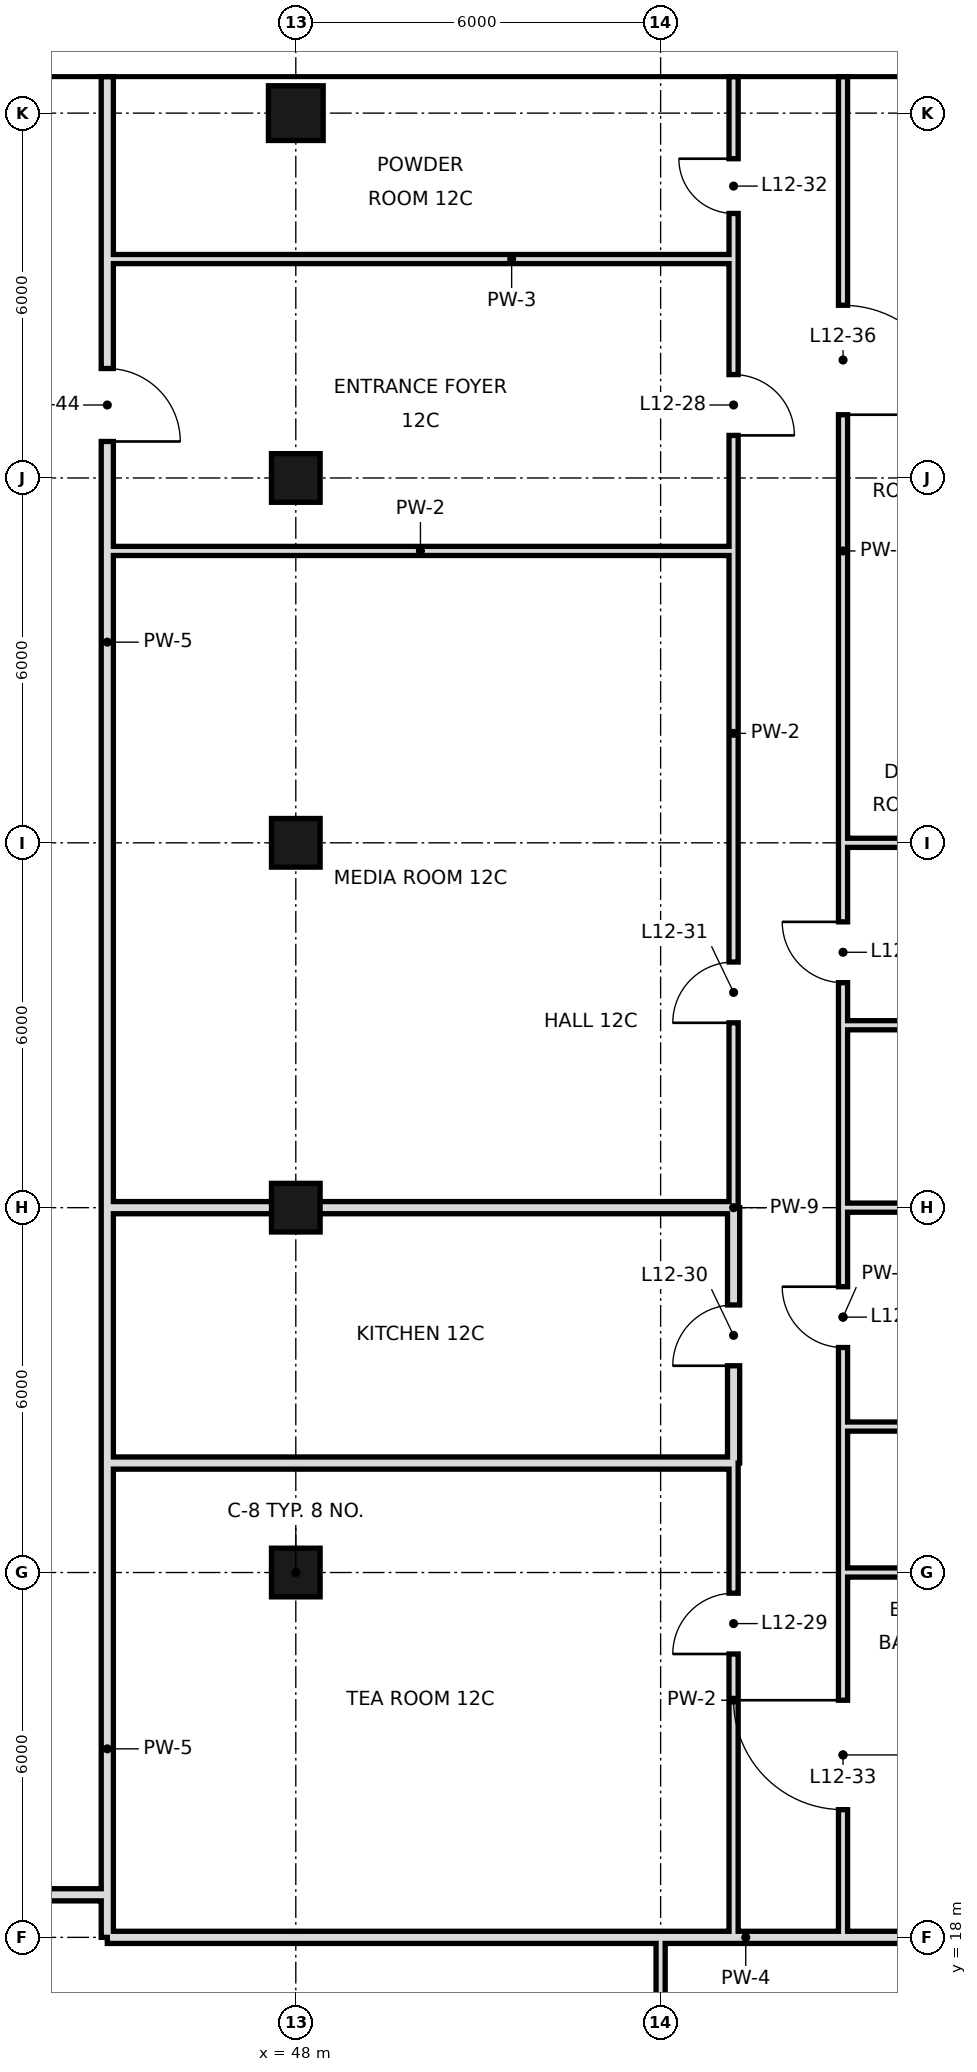
"""IFC4 building model, lengths in metres.
Left out: names, types, materials, properties, quantities, classifications, styles, units other than length and angle.
Written with IfcOpenShell. Run it as: python <this file> out.ifc"""

import sys

from ifc_helpers import new_model, si_unit, direction, frame, frame_2d, origin, origin_2d, place, context, subcontext, project, spatial, rectangle, hollow_rectangle, extrude, element, fill, save


model = new_model("IFC4")
c1 = context("Model", 3, precision=1e-05, world=origin(), true_north=direction((0.0, 1.0)))
c2 = subcontext(c1, "Body", "Model", "MODEL_VIEW")
j1 = project(units=[si_unit("LENGTHUNIT", "METRE"), si_unit("PLANEANGLEUNIT", "RADIAN")], contexts=[c1])
p1 = place(None, origin())
s1 = spatial("IfcSite", under=j1, at=p1, CompositionType="ELEMENT")
p2 = place(p1, origin())
s2 = spatial("IfcBuilding", under=s1, at=p2, CompositionType="ELEMENT")
p3 = place(p2, frame((0.0, 0.0, 64.2)))
s3 = spatial("IfcBuildingStorey", under=s2, at=p3, CompositionType="ELEMENT", Elevation=64.2)
for number, where, z_axis, x_axis in (
    (1, (48.0, 24.0, 0.0), (0.0, 0.0, 1.0), (1.0, 0.0, 0.0)),
    (2, (48.0, 30.0, 0.0), (0.0, 0.0, 1.0), (1.0, 0.0, 0.0)),
    (3, (48.0, 36.0, 0.0), (0.0, 0.0, 1.0), (1.0, 0.0, 0.0)),
    (4, (48.0, 42.0, 0.0), (0.0, 0.0, 1.0), (1.0, 0.0, 0.0)),
):
    element("IfcColumn", number, at=place(p3, frame(where, z_axis=z_axis, x_axis=x_axis)), inside=s3, PredefinedType="COLUMN", context=c2, shape_type="SweptSolid", body=[
        extrude(hollow_rectangle(XDim=0.8, YDim=0.8, WallThickness=0.04, at=origin_2d()), origin(), (0.0, 0.0, 1.0), 3.6),
    ])
p4 = place(p3, frame((48.0, 48.0, 0.0), z_axis=(0.0, 0.0, 1.0), x_axis=(1.0, 0.0, 0.0)))
e5 = element("IfcColumn", 5, at=p4, inside=s3, PredefinedType="COLUMN", context=c2, shape_type="SweptSolid", body=[
    extrude(hollow_rectangle(XDim=0.9, YDim=0.9, WallThickness=0.045, at=origin_2d()), origin(), (0.0, 0.0, 1.0), 3.6),
])
p5 = place(p3, frame((44.9, 18.7, 0.0), z_axis=(0.0, 0.0, 1.0), x_axis=(0.0, 1.0, 0.0)))
e6 = element("IfcWall", 6, at=p5, inside=s3, PredefinedType="SOLIDWALL", context=c2, shape_type="SweptSolid", body=[
    extrude(rectangle(XDim=7.1, YDim=0.2, at=frame_2d((3.55, 0.0))), origin(), (0.0, 0.0, 1.0), 3.42),
])
p6 = place(p3, frame((44.9, 30.0, 0.0), z_axis=(0.0, 0.0, 1.0), x_axis=(0.0, 1.0, 0.0)))
e7 = element("IfcWall", 7, at=p6, inside=s3, PredefinedType="SOLIDWALL", context=c2, shape_type="SweptSolid", body=[
    extrude(rectangle(XDim=18.6, YDim=0.2, at=frame_2d((9.3, 0.0))), origin(), (0.0, 0.0, 1.0), 2.72),
])
p7 = place(p6, frame((12.6, 0.0, 0.0)))
e8 = element("IfcOpeningElement", 8, at=p7, cuts=e7, PredefinedType="OPENING", context=c2, shape_type="SweptSolid", body=[
    extrude(rectangle(XDim=1.2, YDim=2.4, at=frame_2d((0.6, 1.2))), frame((0.0, 0.11, 0.0), z_axis=(0.0, -1.0, 0.0), x_axis=(1.0, 0.0, 0.0)), (0.0, 0.0, 1.0), 0.22),
])
p8 = place(p3, frame((44.9, 25.8, 0.0), z_axis=(0.0, 0.0, 1.0), x_axis=(0.0, 1.0, 0.0)))
e9 = element("IfcWall", 9, at=p8, inside=s3, PredefinedType="SOLIDWALL", context=c2, shape_type="SweptSolid", body=[
    extrude(rectangle(XDim=4.2, YDim=0.2, at=frame_2d((2.1, 0.0))), origin(), (0.0, 0.0, 1.0), 2.97),
])
p9 = place(p3, frame((44.9, 18.0, 0.0), z_axis=(0.0, 0.0, 1.0), x_axis=(0.0, 1.0, 0.0)))
e10 = element("IfcWall", 10, at=p9, inside=s3, PredefinedType="SOLIDWALL", context=c2, shape_type="SweptSolid", body=[
    extrude(rectangle(XDim=0.7, YDim=0.2, at=frame_2d((0.35, 0.0))), origin(), (0.0, 0.0, 1.0), 2.97),
])
p10 = place(p3, frame((54.0, 10.8, 0.0), z_axis=(0.0, 0.0, 1.0), x_axis=(0.0, 1.0, 0.0)))
e11 = element("IfcWall", 11, at=p10, inside=s3, PredefinedType="PARTITIONING", context=c2, shape_type="SweptSolid", body=[
    extrude(rectangle(XDim=7.2, YDim=0.15, at=frame_2d((3.6, 0.0))), origin(), (0.0, 0.0, 1.0), 3.42),
])
p11 = place(p3, frame((55.2, 25.8, 0.0), z_axis=(0.0, 0.0, 1.0), x_axis=(0.0, 1.0, 0.0)))
e12 = element("IfcWall", 12, at=p11, inside=s3, PredefinedType="SOLIDWALL", context=c2, shape_type="SweptSolid", body=[
    extrude(rectangle(XDim=4.2, YDim=0.2, at=frame_2d((2.1, 0.0))), origin(), (0.0, 0.0, 1.0), 2.52),
])
p12 = place(p11, frame((1.6, 0.0, 0.0)))
e13 = element("IfcOpeningElement", 13, at=p12, cuts=e12, PredefinedType="OPENING", context=c2, shape_type="SweptSolid", body=[
    extrude(rectangle(XDim=1.0, YDim=2.4, at=frame_2d((0.5, 1.2))), frame((0.0, 0.11, 0.0), z_axis=(0.0, -1.0, 0.0), x_axis=(1.0, 0.0, 0.0)), (0.0, 0.0, 1.0), 0.22),
])
p13 = place(p3, frame((55.2, 18.0, 0.0), z_axis=(0.0, 0.0, 1.0), x_axis=(0.0, 1.0, 0.0)))
e14 = element("IfcWall", 14, at=p13, inside=s3, PredefinedType="PARTITIONING", context=c2, shape_type="SweptSolid", body=[
    extrude(rectangle(XDim=7.8, YDim=0.15, at=frame_2d((3.9, 0.0))), origin(), (0.0, 0.0, 1.0), 3.42),
])
p14 = place(p13, frame((4.66, 0.0, 0.0)))
e15 = element("IfcOpeningElement", 15, at=p14, cuts=e14, PredefinedType="OPENING", context=c2, shape_type="SweptSolid", body=[
    extrude(rectangle(XDim=1.0, YDim=2.4, at=frame_2d((0.5, 1.2))), frame((0.0, 0.085, 0.0), z_axis=(0.0, -1.0, 0.0), x_axis=(1.0, 0.0, 0.0)), (0.0, 0.0, 1.0), 0.17),
])
p15 = place(p3, frame((55.2, 30.0, 0.0), z_axis=(0.0, 0.0, 1.0), x_axis=(0.0, 1.0, 0.0)))
e16 = element("IfcWall", 16, at=p15, inside=s3, PredefinedType="PARTITIONING", context=c2, shape_type="SweptSolid", body=[
    extrude(rectangle(XDim=15.6, YDim=0.15, at=frame_2d((7.8, 0.0))), origin(), (0.0, 0.0, 1.0), 3.42),
])
p16 = place(p15, frame((12.7, 0.0, 0.0)))
e17 = element("IfcOpeningElement", 17, at=p16, cuts=e16, PredefinedType="OPENING", context=c2, shape_type="SweptSolid", body=[
    extrude(rectangle(XDim=1.0, YDim=2.4, at=frame_2d((0.5, 1.2))), frame((0.0, 0.085, 0.0), z_axis=(0.0, -1.0, 0.0), x_axis=(1.0, 0.0, 0.0)), (0.0, 0.0, 1.0), 0.17),
])
p17 = place(p15, frame((3.04, 0.0, 0.0)))
e18 = element("IfcOpeningElement", 18, at=p17, cuts=e16, PredefinedType="OPENING", context=c2, shape_type="SweptSolid", body=[
    extrude(rectangle(XDim=1.0, YDim=2.4, at=frame_2d((0.5, 1.2))), frame((0.0, 0.085, 0.0), z_axis=(0.0, -1.0, 0.0), x_axis=(1.0, 0.0, 0.0)), (0.0, 0.0, 1.0), 0.17),
])
p18 = place(p3, frame((55.2, 45.6, 0.0), z_axis=(0.0, 0.0, 1.0), x_axis=(0.0, 1.0, 0.0)))
e19 = element("IfcWall", 19, at=p18, inside=s3, PredefinedType="PARTITIONING", context=c2, shape_type="SweptSolid", body=[
    extrude(rectangle(XDim=3.0, YDim=0.15, at=frame_2d((1.5, 0.0))), origin(), (0.0, 0.0, 1.0), 3.42),
])
p19 = place(p18, frame((0.75, 0.0, 0.0)))
e20 = element("IfcOpeningElement", 20, at=p19, cuts=e19, PredefinedType="OPENING", context=c2, shape_type="SweptSolid", body=[
    extrude(rectangle(XDim=0.9, YDim=2.4, at=frame_2d((0.45, 1.2))), frame((0.0, 0.085, 0.0), z_axis=(0.0, -1.0, 0.0), x_axis=(1.0, 0.0, 0.0)), (0.0, 0.0, 1.0), 0.17),
])
p20 = place(p3, frame((57.0, 18.0, 0.0), z_axis=(0.0, 0.0, 1.0), x_axis=(0.0, 1.0, 0.0)))
e21 = element("IfcWall", 21, at=p20, inside=s3, PredefinedType="PARTITIONING", context=c2, shape_type="SweptSolid", body=[
    extrude(rectangle(XDim=6.0, YDim=0.15, at=frame_2d((3.0, 0.0))), origin(), (0.0, 0.0, 1.0), 3.42),
])
p21 = place(p20, frame((2.1, 0.0, 0.0)))
e22 = element("IfcOpeningElement", 22, at=p21, cuts=e21, PredefinedType="OPENING", context=c2, shape_type="SweptSolid", body=[
    extrude(rectangle(XDim=1.8, YDim=2.4, at=frame_2d((0.9, 1.2))), frame((0.0, 0.085, 0.0), z_axis=(0.0, -1.0, 0.0), x_axis=(1.0, 0.0, 0.0)), (0.0, 0.0, 1.0), 0.17),
])
p22 = place(p3, frame((57.0, 26.4, 0.0), z_axis=(0.0, 0.0, 1.0), x_axis=(0.0, 1.0, 0.0)))
e23 = element("IfcWall", 23, at=p22, inside=s3, PredefinedType="PARTITIONING", context=c2, shape_type="SweptSolid", body=[
    extrude(rectangle(XDim=3.6, YDim=0.15, at=frame_2d((1.8, 0.0))), origin(), (0.0, 0.0, 1.0), 3.42),
])
p23 = place(p22, frame((1.3, 0.0, 0.0)))
e24 = element("IfcOpeningElement", 24, at=p23, cuts=e23, PredefinedType="OPENING", context=c2, shape_type="SweptSolid", body=[
    extrude(rectangle(XDim=1.0, YDim=2.4, at=frame_2d((0.5, 1.2))), frame((0.0, 0.085, 0.0), z_axis=(0.0, -1.0, 0.0), x_axis=(1.0, 0.0, 0.0)), (0.0, 0.0, 1.0), 0.17),
])
p24 = place(p3, frame((57.0, 33.0, 0.0), z_axis=(0.0, 0.0, 1.0), x_axis=(0.0, 1.0, 0.0)))
e25 = element("IfcWall", 25, at=p24, inside=s3, PredefinedType="PARTITIONING", context=c2, shape_type="SweptSolid", body=[
    extrude(rectangle(XDim=15.6, YDim=0.15, at=frame_2d((7.8, 0.0))), origin(), (0.0, 0.0, 1.0), 3.42),
])
p25 = place(p24, frame((0.7, 0.0, 0.0)))
e26 = element("IfcOpeningElement", 26, at=p25, cuts=e25, PredefinedType="OPENING", context=c2, shape_type="SweptSolid", body=[
    extrude(rectangle(XDim=1.0, YDim=2.4, at=frame_2d((0.5, 1.2))), frame((0.0, 0.085, 0.0), z_axis=(0.0, -1.0, 0.0), x_axis=(1.0, 0.0, 0.0)), (0.0, 0.0, 1.0), 0.17),
])
p26 = place(p24, frame((10.04, 0.0, 0.0)))
e27 = element("IfcOpeningElement", 27, at=p26, cuts=e25, PredefinedType="OPENING", context=c2, shape_type="SweptSolid", body=[
    extrude(rectangle(XDim=1.8, YDim=2.4, at=frame_2d((0.9, 1.2))), frame((0.0, 0.085, 0.0), z_axis=(0.0, -1.0, 0.0), x_axis=(1.0, 0.0, 0.0)), (0.0, 0.0, 1.0), 0.17),
])
p27 = place(p3, frame((57.0, 24.0, 0.0), z_axis=(0.0, 0.0, 1.0), x_axis=(0.0, 1.0, 0.0)))
e28 = element("IfcWall", 28, at=p27, inside=s3, PredefinedType="PARTITIONING", context=c2, shape_type="SweptSolid", body=[
    extrude(rectangle(XDim=2.4, YDim=0.15, at=frame_2d((1.2, 0.0))), origin(), (0.0, 0.0, 1.0), 3.42),
])
p28 = place(p3, frame((57.0, 30.0, 0.0), z_axis=(0.0, 0.0, 1.0), x_axis=(0.0, 1.0, 0.0)))
e29 = element("IfcWall", 29, at=p28, inside=s3, PredefinedType="PARTITIONING", context=c2, shape_type="SweptSolid", body=[
    extrude(rectangle(XDim=3.0, YDim=0.15, at=frame_2d((1.5, 0.0))), origin(), (0.0, 0.0, 1.0), 3.42),
])
p29 = place(p3, frame((44.9, 18.0, 0.0), z_axis=(0.0, 0.0, 1.0), x_axis=(1.0, 0.0, 0.0)))
e30 = element("IfcWall", 30, at=p29, inside=s3, PredefinedType="SOLIDWALL", context=c2, shape_type="SweptSolid", body=[
    extrude(rectangle(XDim=21.7, YDim=0.2, at=frame_2d((10.85, 0.0))), origin(), (0.0, 0.0, 1.0), 2.52),
])
p30 = place(p3, frame((42.6, 18.7, 0.0), z_axis=(0.0, 0.0, 1.0), x_axis=(1.0, 0.0, 0.0)))
e31 = element("IfcWall", 31, at=p30, inside=s3, PredefinedType="SOLIDWALL", context=c2, shape_type="SweptSolid", body=[
    extrude(rectangle(XDim=2.3, YDim=0.2, at=frame_2d((1.15, 0.0))), origin(), (0.0, 0.0, 1.0), 3.42),
])
p31 = place(p3, frame((57.0, 24.0, 0.0), z_axis=(0.0, 0.0, 1.0), x_axis=(1.0, 0.0, 0.0)))
e32 = element("IfcWall", 32, at=p31, inside=s3, PredefinedType="PARTITIONING", context=c2, shape_type="SweptSolid", body=[
    extrude(rectangle(XDim=3.0, YDim=0.15, at=frame_2d((1.5, 0.0))), origin(), (0.0, 0.0, 1.0), 2.52),
])
p32 = place(p3, frame((44.9, 25.8, 0.0), z_axis=(0.0, 0.0, 1.0), x_axis=(1.0, 0.0, 0.0)))
e33 = element("IfcWall", 33, at=p32, inside=s3, PredefinedType="SOLIDWALL", context=c2, shape_type="SweptSolid", body=[
    extrude(rectangle(XDim=10.3, YDim=0.2, at=frame_2d((5.15, 0.0))), origin(), (0.0, 0.0, 1.0), 2.97),
])
p33 = place(p3, frame((57.0, 26.4, 0.0), z_axis=(0.0, 0.0, 1.0), x_axis=(1.0, 0.0, 0.0)))
e34 = element("IfcWall", 34, at=p33, inside=s3, PredefinedType="PARTITIONING", context=c2, shape_type="SweptSolid", body=[
    extrude(rectangle(XDim=3.0, YDim=0.15, at=frame_2d((1.5, 0.0))), origin(), (0.0, 0.0, 1.0), 3.42),
])
p34 = place(p3, frame((44.9, 30.0, 0.0), z_axis=(0.0, 0.0, 1.0), x_axis=(1.0, 0.0, 0.0)))
e35 = element("IfcWall", 35, at=p34, inside=s3, PredefinedType="SOLIDWALL", context=c2, shape_type="SweptSolid", body=[
    extrude(rectangle(XDim=10.3, YDim=0.2, at=frame_2d((5.15, 0.0))), origin(), (0.0, 0.0, 1.0), 2.52),
])
p35 = place(p3, frame((57.0, 30.0, 0.0), z_axis=(0.0, 0.0, 1.0), x_axis=(1.0, 0.0, 0.0)))
e36 = element("IfcWall", 36, at=p35, inside=s3, PredefinedType="PARTITIONING", context=c2, shape_type="SweptSolid", body=[
    extrude(rectangle(XDim=3.0, YDim=0.15, at=frame_2d((1.5, 0.0))), origin(), (0.0, 0.0, 1.0), 2.52),
])
p36 = place(p3, frame((57.0, 33.0, 0.0), z_axis=(0.0, 0.0, 1.0), x_axis=(1.0, 0.0, 0.0)))
e37 = element("IfcWall", 37, at=p36, inside=s3, PredefinedType="PARTITIONING", context=c2, shape_type="SweptSolid", body=[
    extrude(rectangle(XDim=3.0, YDim=0.15, at=frame_2d((1.5, 0.0))), origin(), (0.0, 0.0, 1.0), 3.42),
])
p37 = place(p3, frame((57.0, 36.0, 0.0), z_axis=(0.0, 0.0, 1.0), x_axis=(1.0, 0.0, 0.0)))
e38 = element("IfcWall", 38, at=p37, inside=s3, PredefinedType="PARTITIONING", context=c2, shape_type="SweptSolid", body=[
    extrude(rectangle(XDim=9.0, YDim=0.15, at=frame_2d((4.5, 0.0))), origin(), (0.0, 0.0, 1.0), 2.52),
])
for number, where, z_axis, x_axis in (
    (39, (44.9, 40.8, 0.0), (0.0, 0.0, 1.0), (1.0, 0.0, 0.0)),
    (40, (44.9, 45.6, 0.0), (0.0, 0.0, 1.0), (1.0, 0.0, 0.0)),
):
    element("IfcWall", number, at=place(p3, frame(where, z_axis=z_axis, x_axis=x_axis)), inside=s3, PredefinedType="PARTITIONING", context=c2, shape_type="SweptSolid", body=[
        extrude(rectangle(XDim=10.3, YDim=0.15, at=frame_2d((5.15, 0.0))), origin(), (0.0, 0.0, 1.0), 3.42),
    ])
p38 = place(p16, frame((1.0, 0.0, 0.0), z_axis=(0.0, 0.0, 1.0), x_axis=(-1.0, 0.0, 0.0)))
e41 = element("IfcDoor", 41, at=p38, inside=s3, OperationType="SINGLE_SWING_RIGHT", PredefinedType="DOOR", context=c2, shape_type="SweptSolid", body=[
    extrude(rectangle(XDim=1.0, YDim=2.4, at=frame_2d((0.5, 1.2))), frame((0.0, 0.025, 0.0), z_axis=(0.0, -1.0, 0.0), x_axis=(1.0, 0.0, 0.0)), (0.0, 0.0, 1.0), 0.05),
])
fill(e17, e41)
p39 = place(p14, origin())
e42 = element("IfcDoor", 42, at=p39, inside=s3, OperationType="SINGLE_SWING_LEFT", PredefinedType="DOOR", context=c2, shape_type="SweptSolid", body=[
    extrude(rectangle(XDim=1.0, YDim=2.4, at=frame_2d((0.5, 1.2))), frame((0.0, 0.025, 0.0), z_axis=(0.0, -1.0, 0.0), x_axis=(1.0, 0.0, 0.0)), (0.0, 0.0, 1.0), 0.05),
])
fill(e15, e42)
p40 = place(p12, origin())
e43 = element("IfcDoor", 43, at=p40, inside=s3, OperationType="SINGLE_SWING_LEFT", PredefinedType="DOOR", context=c2, shape_type="SweptSolid", body=[
    extrude(rectangle(XDim=1.0, YDim=2.4, at=frame_2d((0.5, 1.2))), frame((0.0, 0.025, 0.0), z_axis=(0.0, -1.0, 0.0), x_axis=(1.0, 0.0, 0.0)), (0.0, 0.0, 1.0), 0.05),
])
fill(e13, e43)
p41 = place(p17, origin())
e44 = element("IfcDoor", 44, at=p41, inside=s3, OperationType="SINGLE_SWING_LEFT", PredefinedType="DOOR", context=c2, shape_type="SweptSolid", body=[
    extrude(rectangle(XDim=1.0, YDim=2.4, at=frame_2d((0.5, 1.2))), frame((0.0, 0.025, 0.0), z_axis=(0.0, -1.0, 0.0), x_axis=(1.0, 0.0, 0.0)), (0.0, 0.0, 1.0), 0.05),
])
fill(e18, e44)
p42 = place(p19, frame((0.9, 0.0, 0.0), z_axis=(0.0, 0.0, 1.0), x_axis=(-1.0, 0.0, 0.0)))
e45 = element("IfcDoor", 45, at=p42, inside=s3, OperationType="SINGLE_SWING_LEFT", PredefinedType="DOOR", context=c2, shape_type="SweptSolid", body=[
    extrude(rectangle(XDim=0.9, YDim=2.4, at=frame_2d((0.45, 1.2))), frame((0.0, 0.025, 0.0), z_axis=(0.0, -1.0, 0.0), x_axis=(1.0, 0.0, 0.0)), (0.0, 0.0, 1.0), 0.05),
])
fill(e20, e45)
p43 = place(p21, frame((1.8, 0.0, 0.0), z_axis=(0.0, 0.0, 1.0), x_axis=(-1.0, 0.0, 0.0)))
e46 = element("IfcDoor", 46, at=p43, inside=s3, OperationType="SINGLE_SWING_LEFT", PredefinedType="DOOR", context=c2, shape_type="SweptSolid", body=[
    extrude(rectangle(XDim=1.8, YDim=2.4, at=frame_2d((0.9, 1.2))), frame((0.0, 0.025, 0.0), z_axis=(0.0, -1.0, 0.0), x_axis=(1.0, 0.0, 0.0)), (0.0, 0.0, 1.0), 0.05),
])
fill(e22, e46)
p44 = place(p23, frame((1.0, 0.0, 0.0), z_axis=(0.0, 0.0, 1.0), x_axis=(-1.0, 0.0, 0.0)))
e47 = element("IfcDoor", 47, at=p44, inside=s3, OperationType="SINGLE_SWING_LEFT", PredefinedType="DOOR", context=c2, shape_type="SweptSolid", body=[
    extrude(rectangle(XDim=1.0, YDim=2.4, at=frame_2d((0.5, 1.2))), frame((0.0, 0.025, 0.0), z_axis=(0.0, -1.0, 0.0), x_axis=(1.0, 0.0, 0.0)), (0.0, 0.0, 1.0), 0.05),
])
fill(e24, e47)
p45 = place(p25, frame((1.0, 0.0, 0.0), z_axis=(0.0, 0.0, 1.0), x_axis=(-1.0, 0.0, 0.0)))
e48 = element("IfcDoor", 48, at=p45, inside=s3, OperationType="SINGLE_SWING_LEFT", PredefinedType="DOOR", context=c2, shape_type="SweptSolid", body=[
    extrude(rectangle(XDim=1.0, YDim=2.4, at=frame_2d((0.5, 1.2))), frame((0.0, 0.025, 0.0), z_axis=(0.0, -1.0, 0.0), x_axis=(1.0, 0.0, 0.0)), (0.0, 0.0, 1.0), 0.05),
])
fill(e26, e48)
p46 = place(p26, frame((1.8, 0.0, 0.0), z_axis=(0.0, 0.0, 1.0), x_axis=(-1.0, 0.0, 0.0)))
e49 = element("IfcDoor", 49, at=p46, inside=s3, OperationType="SINGLE_SWING_RIGHT", PredefinedType="DOOR", context=c2, shape_type="SweptSolid", body=[
    extrude(rectangle(XDim=1.8, YDim=2.4, at=frame_2d((0.9, 1.2))), frame((0.0, 0.025, 0.0), z_axis=(0.0, -1.0, 0.0), x_axis=(1.0, 0.0, 0.0)), (0.0, 0.0, 1.0), 0.05),
])
fill(e27, e49)
p47 = place(p7, frame((1.2, 0.0, 0.0), z_axis=(0.0, 0.0, 1.0), x_axis=(-1.0, 0.0, 0.0)))
e50 = element("IfcDoor", 50, at=p47, inside=s3, OperationType="SINGLE_SWING_RIGHT", PredefinedType="DOOR", context=c2, shape_type="SweptSolid", body=[
    extrude(rectangle(XDim=1.2, YDim=2.4, at=frame_2d((0.6, 1.2))), frame((0.0, 0.025, 0.0), z_axis=(0.0, -1.0, 0.0), x_axis=(1.0, 0.0, 0.0)), (0.0, 0.0, 1.0), 0.05),
])
fill(e8, e50)
save(model, sys.argv[1])
